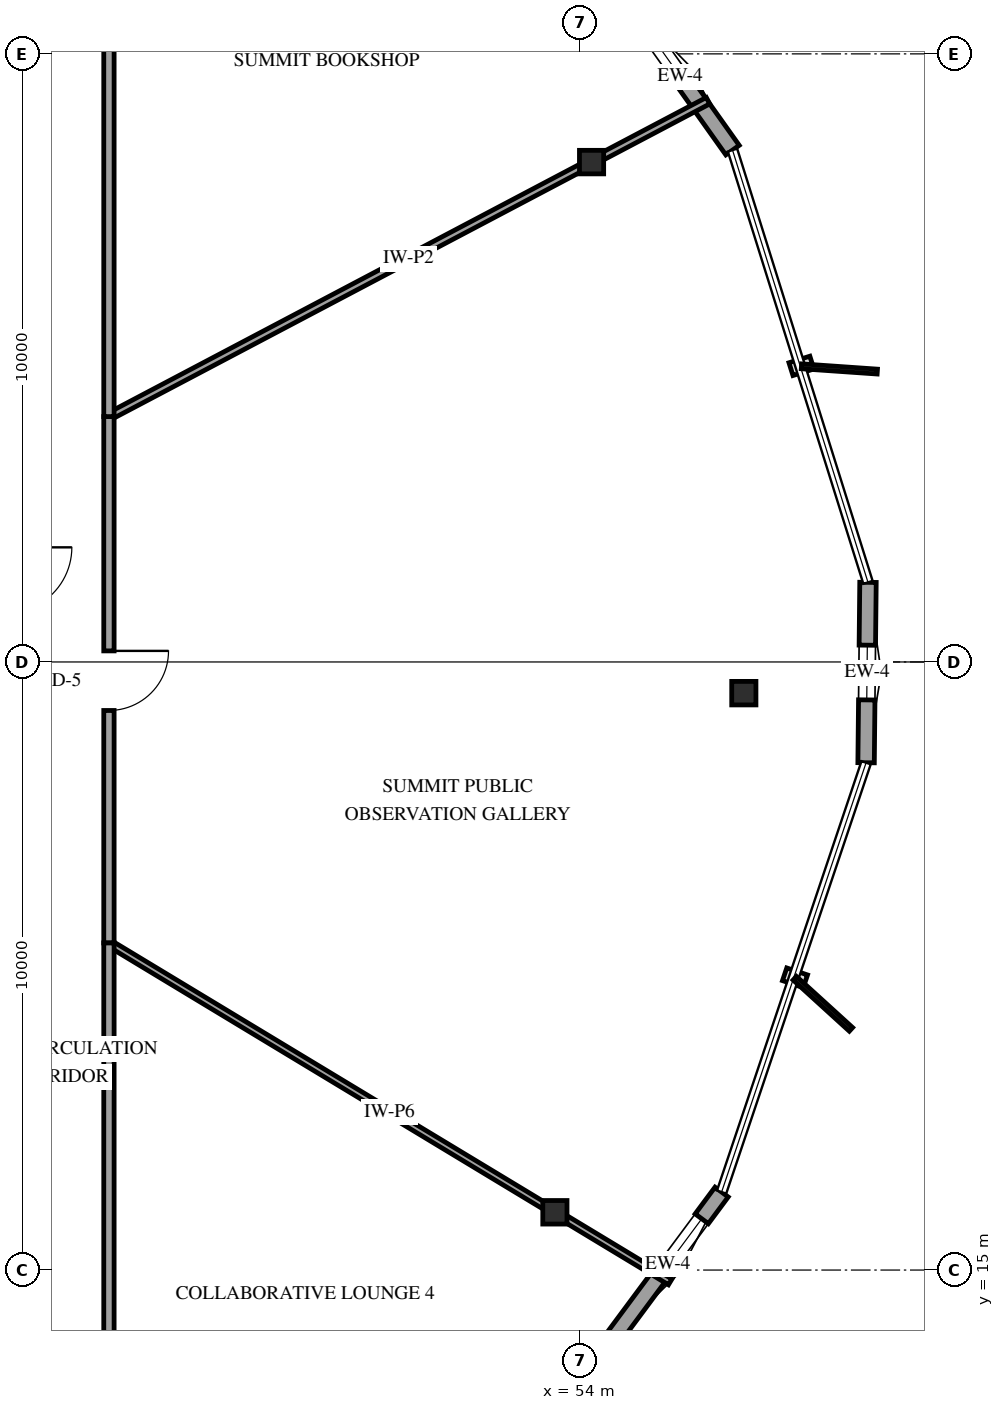
"""IFC4 building model, lengths in metres.
Left out: names, types, materials, properties, quantities, classifications, styles, units other than length and angle.
Written with IfcOpenShell. Run it as: python <this file> out.ifc"""

import sys

from ifc_helpers import new_model, si_unit, direction, frame, frame_2d, origin, origin_2d, place, context, subcontext, project, spatial, rectangle, i_section, extrude, element, fill, save


model = new_model("IFC4")
c1 = context("Model", 3, precision=1e-05, world=origin(), true_north=direction((0.0, 1.0)))
c2 = subcontext(c1, "Body", "Model", "MODEL_VIEW")
j1 = project(units=[si_unit("LENGTHUNIT", "METRE"), si_unit("PLANEANGLEUNIT", "RADIAN")], contexts=[c1])
p1 = place(None, origin())
s1 = spatial("IfcSite", under=j1, at=p1, CompositionType="ELEMENT")
p2 = place(p1, origin())
s2 = spatial("IfcBuilding", under=s1, at=p2, CompositionType="ELEMENT")
p3 = place(p2, frame((0.0, 0.0, 297.25)))
s3 = spatial("IfcBuildingStorey", under=s2, at=p3, CompositionType="ELEMENT", Elevation=297.25)
for number, where, z_axis, x_axis in (
    (1, (54.187, 33.22, 0.0), (0.0, 0.0, 1.0), (1.0, 0.0, 0.0)),
    (2, (53.584, 15.95, 0.0), (0.0, 0.0, 1.0), (1.0, 0.0, 0.0)),
    (3, (56.691, 24.487, 0.0), (0.0, 0.0, 1.0), (1.0, 0.0, 0.0)),
):
    element("IfcColumn", number, at=place(p3, frame(where, z_axis=z_axis, x_axis=x_axis)), inside=s3, PredefinedType="COLUMN", context=c2, shape_type="SweptSolid", body=[
        extrude(i_section(OverallWidth=0.398, OverallDepth=0.387, WebThickness=0.021, FlangeThickness=0.033, FilletRadius=0.038, at=origin_2d()), origin(), (0.0, 0.0, 1.0), 4.2),
    ])
p4 = place(p3, frame((54.557, 13.901, 0.0), z_axis=(0.0, 0.0, 1.0), x_axis=(0.596240662284, 0.802805750253, 0.0)))
e4 = element("IfcWall", 4, at=p4, inside=s3, PredefinedType="SOLIDWALL", context=c2, shape_type="SweptSolid", body=[
    extrude(rectangle(XDim=2.967, YDim=0.27, at=frame_2d((1.483, 0.0))), origin(), (0.0, 0.0, 1.0), 3.274),
])
p5 = place(p4, frame((1.519, 0.0, 0.75)))
e5 = element("IfcOpeningElement", 5, at=p5, cuts=e4, PredefinedType="OPENING", context=c2, shape_type="SweptSolid", body=[
    extrude(rectangle(XDim=0.9, YDim=1.5, at=frame_2d((0.45, 0.75))), frame((0.0, 0.145, 0.0), z_axis=(0.0, -1.0, 0.0), x_axis=(1.0, 0.0, 0.0)), (0.0, 0.0, 1.0), 0.29),
])
p6 = place(p3, frame((58.702, 23.343, 0.0), z_axis=(0.0, 0.0, 1.0), x_axis=(0.010452103923, 0.99994537527, 0.0)))
e6 = element("IfcWall", 6, at=p6, inside=s3, PredefinedType="SOLIDWALL", context=c2, shape_type="SweptSolid", body=[
    extrude(rectangle(XDim=2.967, YDim=0.27, at=frame_2d((1.483, 0.0))), origin(), (0.0, 0.0, 1.0), 3.274),
])
p7 = place(p6, frame((1.033, 0.0, 0.75)))
e7 = element("IfcOpeningElement", 7, at=p7, cuts=e6, PredefinedType="OPENING", context=c2, shape_type="SweptSolid", body=[
    extrude(rectangle(XDim=0.9, YDim=1.5, at=frame_2d((0.45, 0.75))), frame((0.0, 0.145, 0.0), z_axis=(0.0, -1.0, 0.0), x_axis=(1.0, 0.0, 0.0)), (0.0, 0.0, 1.0), 0.29),
])
p8 = place(p3, frame((56.505, 33.417, 0.0), z_axis=(0.0, 0.0, 1.0), x_axis=(-0.579274768915, 0.81513234637, 0.0)))
e8 = element("IfcWall", 8, at=p8, inside=s3, PredefinedType="SOLIDWALL", context=c2, shape_type="SweptSolid", body=[
    extrude(rectangle(XDim=2.967, YDim=0.27, at=frame_2d((1.483, 0.0))), origin(), (0.0, 0.0, 1.0), 3.274),
])
p9 = place(p8, frame((1.325, 0.0, 0.75)))
e9 = element("IfcOpeningElement", 9, at=p9, cuts=e8, PredefinedType="OPENING", context=c2, shape_type="SweptSolid", body=[
    extrude(rectangle(XDim=0.9, YDim=1.5, at=frame_2d((0.45, 0.75))), frame((0.0, 0.145, 0.0), z_axis=(0.0, -1.0, 0.0), x_axis=(1.0, 0.0, 0.0)), (0.0, 0.0, 1.0), 0.29),
])
p10 = place(p3, frame((56.102, 34.23, 0.0), z_axis=(0.0, 0.0, 1.0), x_axis=(-0.884556110355, -0.466433797697, 0.0)))
e10 = element("IfcWall", 10, at=p10, inside=s3, PredefinedType="PARTITIONING", context=c2, shape_type="SweptSolid", body=[
    extrude(rectangle(XDim=11.138, YDim=0.12, at=frame_2d((5.569, 0.0))), origin(), (0.0, 0.0, 1.0), 3.273),
])
p11 = place(p3, frame((46.25, 20.379, 0.0), z_axis=(0.0, 0.0, 1.0), x_axis=(0.856016994911, -0.516947680548, 0.0)))
e11 = element("IfcWall", 11, at=p11, inside=s3, PredefinedType="PARTITIONING", context=c2, shape_type="SweptSolid", body=[
    extrude(rectangle(XDim=10.782, YDim=0.11, at=frame_2d((5.391, 0.0))), origin(), (0.0, 0.0, 1.0), 3.273),
])
p12 = place(p3, frame((46.25, 29.035, 0.0), z_axis=(0.0, 0.0, 1.0), x_axis=(0.0, -1.0, 0.0)))
e12 = element("IfcWall", 12, at=p12, inside=s3, PredefinedType="PARTITIONING", context=c2, shape_type="SweptSolid", body=[
    extrude(rectangle(XDim=8.656, YDim=0.17, at=frame_2d((4.328, 0.0))), origin(), (0.0, 0.0, 1.0), 3.895),
])
p13 = place(p12, frame((3.853, 0.0, 0.0)))
e13 = element("IfcOpeningElement", 13, at=p13, cuts=e12, PredefinedType="OPENING", context=c2, shape_type="SweptSolid", body=[
    extrude(rectangle(XDim=0.98, YDim=2.15, at=frame_2d((0.49, 1.075))), frame((0.0, 0.095, 0.0), z_axis=(0.0, -1.0, 0.0), x_axis=(1.0, 0.0, 0.0)), (0.0, 0.0, 1.0), 0.19),
])
p14 = place(p3, frame((46.25, 36.63, 0.0), z_axis=(0.0, 0.0, 1.0), x_axis=(0.0, -1.0, 0.0)))
e14 = element("IfcWall", 14, at=p14, inside=s3, PredefinedType="PARTITIONING", context=c2, shape_type="SweptSolid", body=[
    extrude(rectangle(XDim=7.595, YDim=0.17, at=frame_2d((3.797, 0.0))), origin(), (0.0, 0.0, 1.0), 3.895),
])
p15 = place(p3, frame((46.25, 20.379, 0.0), z_axis=(0.0, 0.0, 1.0), x_axis=(0.0, -1.0, 0.0)))
e15 = element("IfcWall", 15, at=p15, inside=s3, PredefinedType="PARTITIONING", context=c2, shape_type="SweptSolid", body=[
    extrude(rectangle(XDim=7.009, YDim=0.17, at=frame_2d((3.504, 0.0))), origin(), (0.0, 0.0, 1.0), 3.895),
])
p16 = place(p5, origin())
e16 = element("IfcWindow", 16, at=p16, inside=s3, PartitioningType="SINGLE_PANEL", PredefinedType="WINDOW", context=c2, shape_type="SweptSolid", body=[
    extrude(rectangle(XDim=0.9, YDim=1.5, at=frame_2d((0.45, 0.75))), frame((0.0, 0.03, 0.0), z_axis=(0.0, -1.0, 0.0), x_axis=(1.0, 0.0, 0.0)), (0.0, 0.0, 1.0), 0.06),
])
fill(e5, e16)
p17 = place(p7, origin())
e17 = element("IfcWindow", 17, at=p17, inside=s3, PartitioningType="SINGLE_PANEL", PredefinedType="WINDOW", context=c2, shape_type="SweptSolid", body=[
    extrude(rectangle(XDim=0.9, YDim=1.5, at=frame_2d((0.45, 0.75))), frame((0.0, 0.03, 0.0), z_axis=(0.0, -1.0, 0.0), x_axis=(1.0, 0.0, 0.0)), (0.0, 0.0, 1.0), 0.06),
])
fill(e7, e17)
p18 = place(p9, origin())
e18 = element("IfcWindow", 18, at=p18, inside=s3, PartitioningType="SINGLE_PANEL", PredefinedType="WINDOW", context=c2, shape_type="SweptSolid", body=[
    extrude(rectangle(XDim=0.9, YDim=1.5, at=frame_2d((0.45, 0.75))), frame((0.0, 0.03, 0.0), z_axis=(0.0, -1.0, 0.0), x_axis=(1.0, 0.0, 0.0)), (0.0, 0.0, 1.0), 0.06),
])
fill(e9, e18)
p19 = place(p13, origin())
e19 = element("IfcDoor", 19, at=p19, inside=s3, OperationType="SINGLE_SWING_LEFT", PredefinedType="DOOR", context=c2, shape_type="SweptSolid", body=[
    extrude(rectangle(XDim=0.98, YDim=2.15, at=frame_2d((0.49, 1.075))), frame((0.0, 0.025, 0.0), z_axis=(0.0, -1.0, 0.0), x_axis=(1.0, 0.0, 0.0)), (0.0, 0.0, 1.0), 0.05),
])
fill(e13, e19)
save(model, sys.argv[1])
